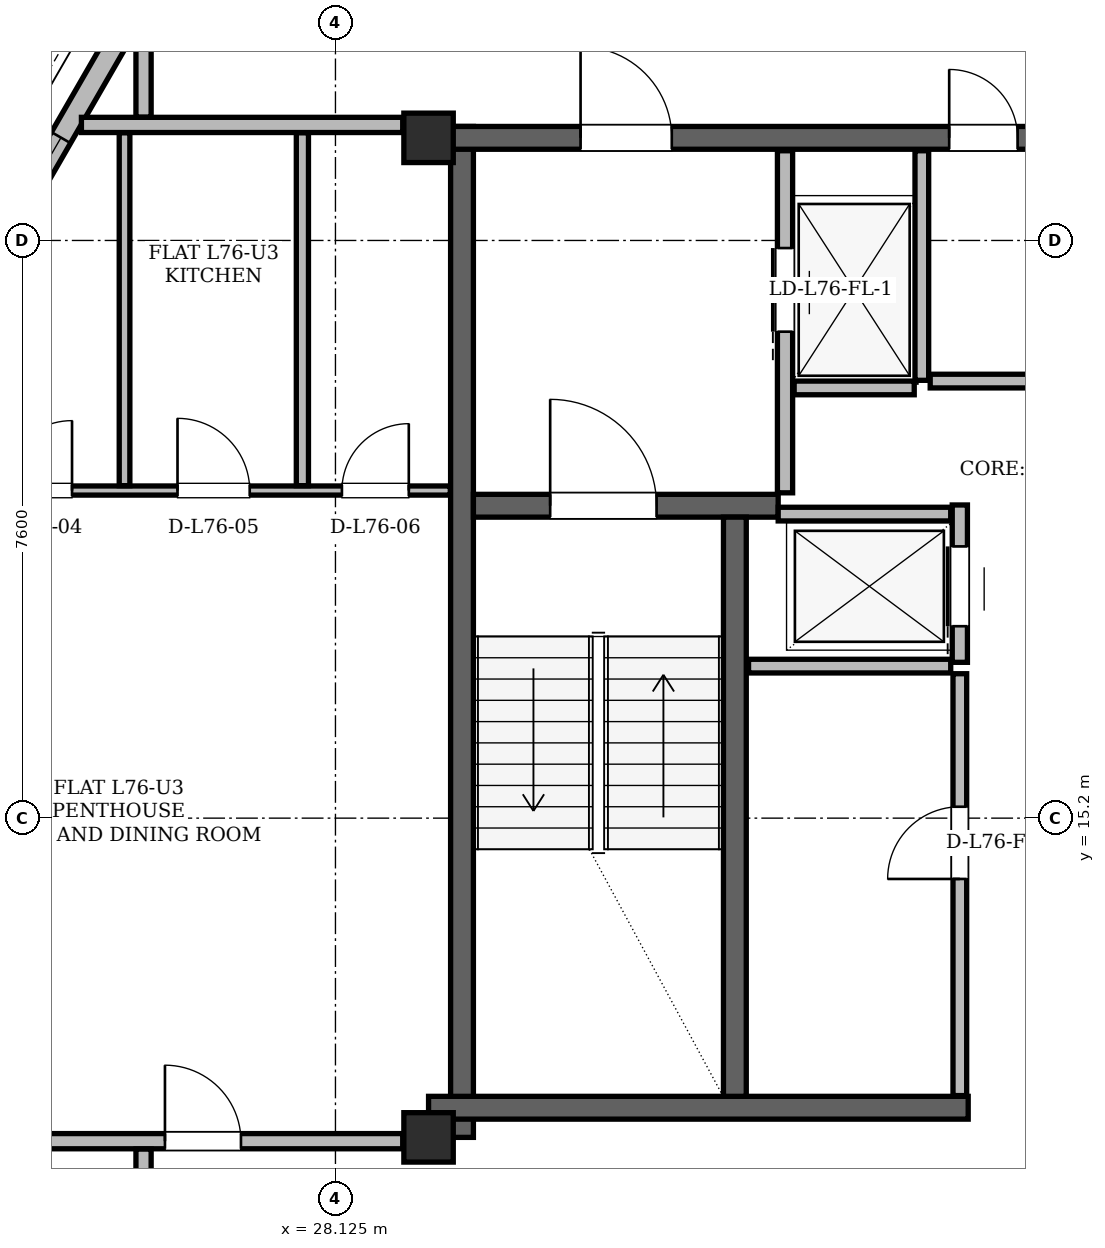
"""IFC4 building model, lengths in metres.
Left out: names, types, materials, properties, quantities, classifications, styles, units other than length and angle.
Written with IfcOpenShell. Run it as: python <this file> out.ifc"""

import sys

from ifc_helpers import new_model, si_unit, direction, frame, frame_2d, origin, origin_2d, place, context, subcontext, project, spatial, rectangle, hollow_rectangle, extrude, element, fill, save


model = new_model("IFC4")
c1 = context("Model", 3, precision=1e-05, world=origin(), true_north=direction((0.0, 1.0)))
c2 = subcontext(c1, "Body", "Model", "MODEL_VIEW")
j1 = project(units=[si_unit("LENGTHUNIT", "METRE"), si_unit("PLANEANGLEUNIT", "RADIAN")], contexts=[c1])
p1 = place(None, origin())
s1 = spatial("IfcSite", under=j1, at=p1, CompositionType="ELEMENT")
p2 = place(p1, origin())
s2 = spatial("IfcBuilding", under=s1, at=p2, CompositionType="ELEMENT")
p3 = place(p2, frame((0.0, 0.0, 288.9)))
s3 = spatial("IfcBuildingStorey", under=s2, at=p3, CompositionType="ELEMENT", Elevation=288.9)
for number, where, z_axis, x_axis in (
    (1, (29.35, 11.0, 0.0), (0.0, 0.0, 1.0), (1.0, 0.0, 0.0)),
    (2, (29.35, 24.15, 0.0), (0.0, 0.0, 1.0), (1.0, 0.0, 0.0)),
):
    element("IfcColumn", number, at=place(p3, frame(where, z_axis=z_axis, x_axis=x_axis)), inside=s3, PredefinedType="COLUMN", context=c2, shape_type="SweptSolid", body=[
        extrude(hollow_rectangle(XDim=0.65, YDim=0.65, WallThickness=0.05, at=origin_2d()), origin(), (0.0, 0.0, 1.0), 3.9),
    ])
p4 = place(p3, frame((29.79, 11.0, 0.0), z_axis=(0.0, 0.0, 1.0), x_axis=(0.0, 1.0, 0.0)))
e3 = element("IfcWall", 3, at=p4, inside=s3, PredefinedType="SHEAR", context=c2, shape_type="SweptSolid", body=[
    extrude(rectangle(XDim=13.3, YDim=0.3, at=frame_2d((6.65, 0.0))), origin(), (0.0, 0.0, 1.0), 3.68),
])
p5 = place(p3, frame((29.35, 11.39, 0.0), z_axis=(0.0, 0.0, 1.0), x_axis=(1.0, 0.0, 0.0)))
e4 = element("IfcWall", 4, at=p5, inside=s3, PredefinedType="SHEAR", context=c2, shape_type="SweptSolid", body=[
    extrude(rectangle(XDim=7.1, YDim=0.3, at=frame_2d((3.55, 0.0))), origin(), (0.0, 0.0, 1.0), 3.68),
])
p6 = place(p3, frame((29.65, 24.15, 0.0), z_axis=(0.0, 0.0, 1.0), x_axis=(1.0, 0.0, 0.0)))
e5 = element("IfcWall", 5, at=p6, inside=s3, PredefinedType="SHEAR", context=c2, shape_type="SweptSolid", body=[
    extrude(rectangle(XDim=15.7, YDim=0.3, at=frame_2d((7.85, 0.0))), origin(), (0.0, 0.0, 1.0), 3.68),
])
p7 = place(p6, frame((1.7, 0.0, 0.0)))
e6 = element("IfcOpeningElement", 6, at=p7, cuts=e5, PredefinedType="OPENING", context=c2, shape_type="SweptSolid", body=[
    extrude(rectangle(XDim=1.2, YDim=2.2, at=frame_2d((0.6, 1.1))), frame((0.0, 0.15, 0.0), z_axis=(0.0, -1.0, 0.0), x_axis=(1.0, 0.0, 0.0)), (0.0, 0.0, 1.0), 0.3),
])
p8 = place(p6, frame((12.8, 0.0, 0.0)))
e7 = element("IfcOpeningElement", 7, at=p8, cuts=e5, PredefinedType="OPENING", context=c2, shape_type="SweptSolid", body=[
    extrude(rectangle(XDim=1.2, YDim=2.2, at=frame_2d((0.6, 1.1))), frame((0.0, 0.15, 0.0), z_axis=(0.0, -1.0, 0.0), x_axis=(1.0, 0.0, 0.0)), (0.0, 0.0, 1.0), 0.3),
])
p9 = place(p6, frame((6.55, 0.0, 0.0)))
e8 = element("IfcOpeningElement", 8, at=p9, cuts=e5, PredefinedType="OPENING", context=c2, shape_type="SweptSolid", body=[
    extrude(rectangle(XDim=0.9, YDim=2.05, at=frame_2d((0.45, 1.025))), frame((0.0, 0.15, 0.0), z_axis=(0.0, -1.0, 0.0), x_axis=(1.0, 0.0, 0.0)), (0.0, 0.0, 1.0), 0.3),
])
p10 = place(p6, frame((8.45, 0.0, 0.0)))
e9 = element("IfcOpeningElement", 9, at=p10, cuts=e5, PredefinedType="OPENING", context=c2, shape_type="SweptSolid", body=[
    extrude(rectangle(XDim=0.9, YDim=2.05, at=frame_2d((0.45, 1.025))), frame((0.0, 0.15, 0.0), z_axis=(0.0, -1.0, 0.0), x_axis=(1.0, 0.0, 0.0)), (0.0, 0.0, 1.0), 0.3),
])
p11 = place(p3, frame((29.94, 19.31, 0.0), z_axis=(0.0, 0.0, 1.0), x_axis=(1.0, 0.0, 0.0)))
e10 = element("IfcWall", 10, at=p11, inside=s3, PredefinedType="SHEAR", context=c2, shape_type="SweptSolid", body=[
    extrude(rectangle(XDim=4.01, YDim=0.3, at=frame_2d((2.005, 0.0))), origin(), (0.0, 0.0, 1.0), 3.68),
])
p12 = place(p11, frame((1.01, 0.0, 0.0)))
e11 = element("IfcOpeningElement", 11, at=p12, cuts=e10, PredefinedType="OPENING", context=c2, shape_type="SweptSolid", body=[
    extrude(rectangle(XDim=1.4, YDim=2.2, at=frame_2d((0.7, 1.1))), frame((0.0, 0.15, 0.0), z_axis=(0.0, -1.0, 0.0), x_axis=(1.0, 0.0, 0.0)), (0.0, 0.0, 1.0), 0.3),
])
p13 = place(p3, frame((33.38, 11.54, 0.0), z_axis=(0.0, 0.0, 1.0), x_axis=(0.0, 1.0, 0.0)))
e12 = element("IfcWall", 12, at=p13, inside=s3, PredefinedType="SHEAR", context=c2, shape_type="SweptSolid", body=[
    extrude(rectangle(XDim=7.62, YDim=0.3, at=frame_2d((3.81, 0.0))), origin(), (0.0, 0.0, 1.0), 3.68),
])
p14 = place(p3, frame((35.387, 42.986, 0.0), z_axis=(0.0, 0.0, 1.0), x_axis=(-0.499995967686, -0.86602773183, 0.0)))
e13 = element("IfcWall", 13, at=p14, inside=s3, PredefinedType="SOLIDWALL", context=c2, shape_type="SweptSolid", body=[
    extrude(rectangle(XDim=37.526, YDim=0.29, at=frame_2d((18.763, 0.0))), origin(), (0.0, 0.0, 1.0), 3.058),
])
p15 = place(p14, frame((3.74, 0.0, 0.0)))
e14 = element("IfcOpeningElement", 14, at=p15, cuts=e13, PredefinedType="OPENING", context=c2, shape_type="SweptSolid", body=[
    extrude(rectangle(XDim=1.3, YDim=2.2, at=frame_2d((0.65, 1.1))), frame((0.0, 0.145, 0.0), z_axis=(0.0, -1.0, 0.0), x_axis=(1.0, 0.0, 0.0)), (0.0, 0.0, 1.0), 0.29),
])
p16 = place(p14, frame((27.991, 0.0, 0.0)))
e15 = element("IfcOpeningElement", 15, at=p16, cuts=e13, PredefinedType="OPENING", context=c2, shape_type="SweptSolid", body=[
    extrude(rectangle(XDim=1.5, YDim=2.2, at=frame_2d((0.75, 1.1))), frame((0.0, 0.145, 0.0), z_axis=(0.0, -1.0, 0.0), x_axis=(1.0, 0.0, 0.0)), (0.0, 0.0, 1.0), 0.29),
])
p17 = place(p14, frame((35.454, 0.0, 0.85)))
e16 = element("IfcOpeningElement", 16, at=p17, cuts=e13, PredefinedType="OPENING", context=c2, shape_type="SweptSolid", body=[
    extrude(rectangle(XDim=1.2, YDim=1.48, at=frame_2d((0.6, 0.74))), frame((0.0, 0.145, 0.0), z_axis=(0.0, -1.0, 0.0), x_axis=(1.0, 0.0, 0.0)), (0.0, 0.0, 1.0), 0.29),
])
p18 = place(p14, frame((33.674, 0.0, 0.85)))
e17 = element("IfcOpeningElement", 17, at=p18, cuts=e13, PredefinedType="OPENING", context=c2, shape_type="SweptSolid", body=[
    extrude(rectangle(XDim=1.2, YDim=1.48, at=frame_2d((0.6, 0.74))), frame((0.0, 0.145, 0.0), z_axis=(0.0, -1.0, 0.0), x_axis=(1.0, 0.0, 0.0)), (0.0, 0.0, 1.0), 0.29),
])
p19 = place(p14, frame((21.746, 0.0, 0.85)))
e18 = element("IfcOpeningElement", 18, at=p19, cuts=e13, PredefinedType="OPENING", context=c2, shape_type="SweptSolid", body=[
    extrude(rectangle(XDim=1.6, YDim=1.7, at=frame_2d((0.8, 0.85))), frame((0.0, 0.145, 0.0), z_axis=(0.0, -1.0, 0.0), x_axis=(1.0, 0.0, 0.0)), (0.0, 0.0, 1.0), 0.29),
])
p20 = place(p14, frame((8.642, 0.0, 0.85)))
e19 = element("IfcOpeningElement", 19, at=p20, cuts=e13, PredefinedType="OPENING", context=c2, shape_type="SweptSolid", body=[
    extrude(rectangle(XDim=1.2, YDim=1.48, at=frame_2d((0.6, 0.74))), frame((0.0, 0.145, 0.0), z_axis=(0.0, -1.0, 0.0), x_axis=(1.0, 0.0, 0.0)), (0.0, 0.0, 1.0), 0.29),
])
p21 = place(p14, frame((16.523, 0.0, 0.85)))
e20 = element("IfcOpeningElement", 20, at=p21, cuts=e13, PredefinedType="OPENING", context=c2, shape_type="SweptSolid", body=[
    extrude(rectangle(XDim=1.8, YDim=1.75, at=frame_2d((0.9, 0.875))), frame((0.0, 0.145, 0.0), z_axis=(0.0, -1.0, 0.0), x_axis=(1.0, 0.0, 0.0)), (0.0, 0.0, 1.0), 0.29),
])
p22 = place(p14, frame((6.715, 0.0, 0.85)))
e21 = element("IfcOpeningElement", 21, at=p22, cuts=e13, PredefinedType="OPENING", context=c2, shape_type="SweptSolid", body=[
    extrude(rectangle(XDim=1.2, YDim=1.48, at=frame_2d((0.6, 0.74))), frame((0.0, 0.145, 0.0), z_axis=(0.0, -1.0, 0.0), x_axis=(1.0, 0.0, 0.0)), (0.0, 0.0, 1.0), 0.29),
])
p23 = place(p14, frame((1.125, 0.0, 0.85)))
e22 = element("IfcOpeningElement", 22, at=p23, cuts=e13, PredefinedType="OPENING", context=c2, shape_type="SweptSolid", body=[
    extrude(rectangle(XDim=1.2, YDim=1.48, at=frame_2d((0.6, 0.74))), frame((0.0, 0.145, 0.0), z_axis=(0.0, -1.0, 0.0), x_axis=(1.0, 0.0, 0.0)), (0.0, 0.0, 1.0), 0.29),
])
p24 = place(p3, frame((34.04, 19.48, 0.0), z_axis=(0.0, 0.0, 1.0), x_axis=(0.0, 1.0, 0.0)))
e23 = element("IfcWall", 23, at=p24, inside=s3, PredefinedType="PARTITIONING", context=c2, shape_type="SweptSolid", body=[
    extrude(rectangle(XDim=4.5, YDim=0.2, at=frame_2d((2.25, 0.0))), origin(), (0.0, 0.0, 1.0), 3.68),
])
p25 = place(p24, frame((2.12, 0.0, 0.0)))
e24 = element("IfcOpeningElement", 24, at=p25, cuts=e23, PredefinedType="OPENING", context=c2, shape_type="SweptSolid", body=[
    extrude(rectangle(XDim=1.1, YDim=2.2, at=frame_2d((0.55, 1.1))), frame((0.0, 0.1, 0.0), z_axis=(0.0, -1.0, 0.0), x_axis=(1.0, 0.0, 0.0)), (0.0, 0.0, 1.0), 0.2),
])
p26 = place(p3, frame((35.84, 20.96, 0.0), z_axis=(0.0, 0.0, 1.0), x_axis=(0.0, 1.0, 0.0)))
e25 = element("IfcWall", 25, at=p26, inside=s3, PredefinedType="PARTITIONING", context=c2, shape_type="SweptSolid", body=[
    extrude(rectangle(XDim=3.02, YDim=0.18, at=frame_2d((1.51, 0.0))), origin(), (0.0, 0.0, 1.0), 3.68),
])
p27 = place(p3, frame((34.16, 20.86, 0.0), z_axis=(0.0, 0.0, 1.0), x_axis=(1.0, 0.0, 0.0)))
e26 = element("IfcWall", 26, at=p27, inside=s3, PredefinedType="PARTITIONING", context=c2, shape_type="SweptSolid", body=[
    extrude(rectangle(XDim=1.58, YDim=0.18, at=frame_2d((0.79, 0.0))), origin(), (0.0, 0.0, 1.0), 3.68),
])
p28 = place(p3, frame((36.34, 17.25, 0.0), z_axis=(0.0, 0.0, 1.0), x_axis=(0.0, 1.0, 0.0)))
e27 = element("IfcWall", 27, at=p28, inside=s3, PredefinedType="PARTITIONING", context=c2, shape_type="SweptSolid", body=[
    extrude(rectangle(XDim=2.07, YDim=0.2, at=frame_2d((1.035, 0.0))), origin(), (0.0, 0.0, 1.0), 3.68),
])
p29 = place(p28, frame((0.475, 0.0, 0.0)))
e28 = element("IfcOpeningElement", 28, at=p29, cuts=e27, PredefinedType="OPENING", context=c2, shape_type="SweptSolid", body=[
    extrude(rectangle(XDim=1.05, YDim=2.15, at=frame_2d((0.525, 1.075))), frame((0.0, 0.1, 0.0), z_axis=(0.0, -1.0, 0.0), x_axis=(1.0, 0.0, 0.0)), (0.0, 0.0, 1.0), 0.2),
])
p30 = place(p3, frame((33.95, 19.2, 0.0), z_axis=(0.0, 0.0, 1.0), x_axis=(1.0, 0.0, 0.0)))
e29 = element("IfcWall", 29, at=p30, inside=s3, PredefinedType="PARTITIONING", context=c2, shape_type="SweptSolid", body=[
    extrude(rectangle(XDim=2.27, YDim=0.18, at=frame_2d((1.135, 0.0))), origin(), (0.0, 0.0, 1.0), 3.68),
])
p31 = place(p3, frame((33.56, 17.2, 0.0), z_axis=(0.0, 0.0, 1.0), x_axis=(1.0, 0.0, 0.0)))
e30 = element("IfcWall", 30, at=p31, inside=s3, PredefinedType="PARTITIONING", context=c2, shape_type="SweptSolid", body=[
    extrude(rectangle(XDim=2.66, YDim=0.18, at=frame_2d((1.33, 0.0))), origin(), (0.0, 0.0, 1.0), 3.68),
])
p32 = place(p3, frame((36.34, 11.55, 0.0), z_axis=(0.0, 0.0, 1.0), x_axis=(0.0, 1.0, 0.0)))
e31 = element("IfcWall", 31, at=p32, inside=s3, PredefinedType="PARTITIONING", context=c2, shape_type="SweptSolid", body=[
    extrude(rectangle(XDim=5.55, YDim=0.18, at=frame_2d((2.775, 0.0))), origin(), (0.0, 0.0, 1.0), 3.68),
])
p33 = place(p32, frame((2.85, 0.0, 0.0)))
e32 = element("IfcOpeningElement", 32, at=p33, cuts=e31, PredefinedType="OPENING", context=c2, shape_type="SweptSolid", body=[
    extrude(rectangle(XDim=0.95, YDim=2.1, at=frame_2d((0.475, 1.05))), frame((0.0, 0.09, 0.0), z_axis=(0.0, -1.0, 0.0), x_axis=(1.0, 0.0, 0.0)), (0.0, 0.0, 1.0), 0.18),
])
p34 = place(p3, frame((35.95, 20.95, 0.0), z_axis=(0.0, 0.0, 1.0), x_axis=(1.0, 0.0, 0.0)))
e33 = element("IfcWall", 33, at=p34, inside=s3, PredefinedType="PARTITIONING", context=c2, shape_type="SweptSolid", body=[
    extrude(rectangle(XDim=3.1, YDim=0.18, at=frame_2d((1.55, 0.0))), origin(), (0.0, 0.0, 1.0), 3.68),
])
p35 = place(p3, frame((17.063, 10.95, 0.0), z_axis=(0.0, 0.0, 1.0), x_axis=(1.0, 0.0, 0.0)))
e34 = element("IfcWall", 34, at=p35, inside=s3, PredefinedType="PARTITIONING", context=c2, shape_type="SweptSolid", body=[
    extrude(rectangle(XDim=11.947, YDim=0.2, at=frame_2d((5.973, 0.0))), origin(), (0.0, 0.0, 1.0), 3.266),
])
p36 = place(p35, frame((8.818, 0.0, 0.0)))
e35 = element("IfcOpeningElement", 35, at=p36, cuts=e34, PredefinedType="OPENING", context=c2, shape_type="SweptSolid", body=[
    extrude(rectangle(XDim=1.0, YDim=2.18, at=frame_2d((0.5, 1.09))), frame((0.0, 0.1, 0.0), z_axis=(0.0, -1.0, 0.0), x_axis=(1.0, 0.0, 0.0)), (0.0, 0.0, 1.0), 0.2),
])
p37 = place(p3, frame((22.006, 19.51, 0.0), z_axis=(0.0, 0.0, 1.0), x_axis=(1.0, 0.0, 0.0)))
e36 = element("IfcWall", 36, at=p37, inside=s3, PredefinedType="PARTITIONING", context=c2, shape_type="SweptSolid", body=[
    extrude(rectangle(XDim=7.63, YDim=0.12, at=frame_2d((3.815, 0.0))), origin(), (0.0, 0.0, 1.0), 2.82),
])
p38 = place(p37, frame((1.734, 0.0, 0.0)))
e37 = element("IfcOpeningElement", 37, at=p38, cuts=e36, PredefinedType="OPENING", context=c2, shape_type="SweptSolid", body=[
    extrude(rectangle(XDim=0.92, YDim=2.12, at=frame_2d((0.46, 1.06))), frame((0.0, 0.06, 0.0), z_axis=(0.0, -1.0, 0.0), x_axis=(1.0, 0.0, 0.0)), (0.0, 0.0, 1.0), 0.12),
])
p39 = place(p37, frame((4.042, 0.0, 0.0)))
e38 = element("IfcOpeningElement", 38, at=p39, cuts=e36, PredefinedType="OPENING", context=c2, shape_type="SweptSolid", body=[
    extrude(rectangle(XDim=0.95, YDim=2.1, at=frame_2d((0.475, 1.05))), frame((0.0, 0.06, 0.0), z_axis=(0.0, -1.0, 0.0), x_axis=(1.0, 0.0, 0.0)), (0.0, 0.0, 1.0), 0.12),
])
p40 = place(p37, frame((6.205, 0.0, 0.0)))
e39 = element("IfcOpeningElement", 39, at=p40, cuts=e36, PredefinedType="OPENING", context=c2, shape_type="SweptSolid", body=[
    extrude(rectangle(XDim=0.88, YDim=2.08, at=frame_2d((0.44, 1.04))), frame((0.0, 0.06, 0.0), z_axis=(0.0, -1.0, 0.0), x_axis=(1.0, 0.0, 0.0)), (0.0, 0.0, 1.0), 0.12),
])
p41 = place(p3, frame((24.783, 24.32, 0.0), z_axis=(0.0, 0.0, 1.0), x_axis=(1.0, 0.0, 0.0)))
e40 = element("IfcWall", 40, at=p41, inside=s3, PredefinedType="PARTITIONING", context=c2, shape_type="SweptSolid", body=[
    extrude(rectangle(XDim=4.227, YDim=0.2, at=frame_2d((2.114, 0.0))), origin(), (0.0, 0.0, 1.0), 3.68),
])
p42 = place(p3, frame((25.35, 19.574, 0.0), z_axis=(0.0, 0.0, 1.0), x_axis=(0.0, 1.0, 0.0)))
e41 = element("IfcWall", 41, at=p42, inside=s3, PredefinedType="PARTITIONING", context=c2, shape_type="SweptSolid", body=[
    extrude(rectangle(XDim=4.642, YDim=0.14, at=frame_2d((2.321, 0.0))), origin(), (0.0, 0.0, 1.0), 3.68),
])
p43 = place(p3, frame((25.6, 9.404, 0.0), z_axis=(0.0, 0.0, 1.0), x_axis=(0.0, 1.0, 0.0)))
e42 = element("IfcWall", 42, at=p43, inside=s3, PredefinedType="PARTITIONING", context=c2, shape_type="SweptSolid", body=[
    extrude(rectangle(XDim=1.442, YDim=0.2, at=frame_2d((0.721, 0.0))), origin(), (0.0, 0.0, 1.0), 3.266),
])
p44 = place(p3, frame((25.6, 24.424, 0.0), z_axis=(0.0, 0.0, 1.0), x_axis=(0.0, 1.0, 0.0)))
e43 = element("IfcWall", 43, at=p44, inside=s3, PredefinedType="PARTITIONING", context=c2, shape_type="SweptSolid", body=[
    extrude(rectangle(XDim=1.31, YDim=0.2, at=frame_2d((0.655, 0.0))), origin(), (0.0, 0.0, 1.0), 3.058),
])
p45 = place(p3, frame((27.69, 19.574, 0.0), z_axis=(0.0, 0.0, 1.0), x_axis=(0.0, 1.0, 0.0)))
e44 = element("IfcWall", 44, at=p45, inside=s3, PredefinedType="PARTITIONING", context=c2, shape_type="SweptSolid", body=[
    extrude(rectangle(XDim=4.642, YDim=0.16, at=frame_2d((2.321, 0.0))), origin(), (0.0, 0.0, 1.0), 3.68),
])
p46 = place(p19, origin())
e45 = element("IfcWindow", 45, at=p46, inside=s3, PartitioningType="SINGLE_PANEL", PredefinedType="WINDOW", context=c2, shape_type="SweptSolid", body=[
    extrude(rectangle(XDim=1.6, YDim=1.7, at=frame_2d((0.8, 0.85))), frame((0.0, 0.03, 0.0), z_axis=(0.0, -1.0, 0.0), x_axis=(1.0, 0.0, 0.0)), (0.0, 0.0, 1.0), 0.06),
])
fill(e18, e45)
p47 = place(p33, origin())
e46 = element("IfcDoor", 46, at=p47, inside=s3, OperationType="SINGLE_SWING_LEFT", PredefinedType="DOOR", context=c2, shape_type="SweptSolid", body=[
    extrude(rectangle(XDim=0.95, YDim=2.1, at=frame_2d((0.475, 1.05))), frame((0.0, 0.025, 0.0), z_axis=(0.0, -1.0, 0.0), x_axis=(1.0, 0.0, 0.0)), (0.0, 0.0, 1.0), 0.05),
])
fill(e32, e46)
p48 = place(p25, origin())
e47 = element("IfcDoor", 47, at=p48, inside=s3, OperationType="SLIDING_TO_LEFT", PredefinedType="DOOR", context=c2, shape_type="SweptSolid", body=[
    extrude(rectangle(XDim=1.1, YDim=2.2, at=frame_2d((0.55, 1.1))), frame((0.0, 0.025, 0.0), z_axis=(0.0, -1.0, 0.0), x_axis=(1.0, 0.0, 0.0)), (0.0, 0.0, 1.0), 0.05),
])
fill(e24, e47)
p49 = place(p29, origin())
e48 = element("IfcDoor", 48, at=p49, inside=s3, OperationType="SLIDING_TO_LEFT", PredefinedType="DOOR", context=c2, shape_type="SweptSolid", body=[
    extrude(rectangle(XDim=1.05, YDim=2.15, at=frame_2d((0.525, 1.075))), frame((0.0, 0.025, 0.0), z_axis=(0.0, -1.0, 0.0), x_axis=(1.0, 0.0, 0.0)), (0.0, 0.0, 1.0), 0.05),
])
fill(e28, e48)
p50 = place(p12, origin())
e49 = element("IfcDoor", 49, at=p50, inside=s3, OperationType="SINGLE_SWING_LEFT", PredefinedType="DOOR", context=c2, shape_type="SweptSolid", body=[
    extrude(rectangle(XDim=1.4, YDim=2.2, at=frame_2d((0.7, 1.1))), frame((0.0, 0.025, 0.0), z_axis=(0.0, -1.0, 0.0), x_axis=(1.0, 0.0, 0.0)), (0.0, 0.0, 1.0), 0.05),
])
fill(e11, e49)
p51 = place(p7, origin())
e50 = element("IfcDoor", 50, at=p51, inside=s3, OperationType="SINGLE_SWING_LEFT", PredefinedType="DOOR", context=c2, shape_type="SweptSolid", body=[
    extrude(rectangle(XDim=1.2, YDim=2.2, at=frame_2d((0.6, 1.1))), frame((0.0, 0.025, 0.0), z_axis=(0.0, -1.0, 0.0), x_axis=(1.0, 0.0, 0.0)), (0.0, 0.0, 1.0), 0.05),
])
fill(e6, e50)
p52 = place(p9, origin())
e51 = element("IfcDoor", 51, at=p52, inside=s3, OperationType="SINGLE_SWING_LEFT", PredefinedType="DOOR", context=c2, shape_type="SweptSolid", body=[
    extrude(rectangle(XDim=0.9, YDim=2.05, at=frame_2d((0.45, 1.025))), frame((0.0, 0.025, 0.0), z_axis=(0.0, -1.0, 0.0), x_axis=(1.0, 0.0, 0.0)), (0.0, 0.0, 1.0), 0.05),
])
fill(e8, e51)
p53 = place(p36, origin())
e52 = element("IfcDoor", 52, at=p53, inside=s3, OperationType="SINGLE_SWING_LEFT", PredefinedType="DOOR", context=c2, shape_type="SweptSolid", body=[
    extrude(rectangle(XDim=1.0, YDim=2.18, at=frame_2d((0.5, 1.09))), frame((0.0, 0.025, 0.0), z_axis=(0.0, -1.0, 0.0), x_axis=(1.0, 0.0, 0.0)), (0.0, 0.0, 1.0), 0.05),
])
fill(e35, e52)
p54 = place(p38, origin())
e53 = element("IfcDoor", 53, at=p54, inside=s3, OperationType="SINGLE_SWING_RIGHT", PredefinedType="DOOR", context=c2, shape_type="SweptSolid", body=[
    extrude(rectangle(XDim=0.92, YDim=2.12, at=frame_2d((0.46, 1.06))), frame((0.0, 0.025, 0.0), z_axis=(0.0, -1.0, 0.0), x_axis=(1.0, 0.0, 0.0)), (0.0, 0.0, 1.0), 0.05),
])
fill(e37, e53)
p55 = place(p39, origin())
e54 = element("IfcDoor", 54, at=p55, inside=s3, OperationType="SINGLE_SWING_LEFT", PredefinedType="DOOR", context=c2, shape_type="SweptSolid", body=[
    extrude(rectangle(XDim=0.95, YDim=2.1, at=frame_2d((0.475, 1.05))), frame((0.0, 0.025, 0.0), z_axis=(0.0, -1.0, 0.0), x_axis=(1.0, 0.0, 0.0)), (0.0, 0.0, 1.0), 0.05),
])
fill(e38, e54)
p56 = place(p40, origin())
e55 = element("IfcDoor", 55, at=p56, inside=s3, OperationType="SINGLE_SWING_RIGHT", PredefinedType="DOOR", context=c2, shape_type="SweptSolid", body=[
    extrude(rectangle(XDim=0.88, YDim=2.08, at=frame_2d((0.44, 1.04))), frame((0.0, 0.025, 0.0), z_axis=(0.0, -1.0, 0.0), x_axis=(1.0, 0.0, 0.0)), (0.0, 0.0, 1.0), 0.05),
])
fill(e39, e55)
save(model, sys.argv[1])
